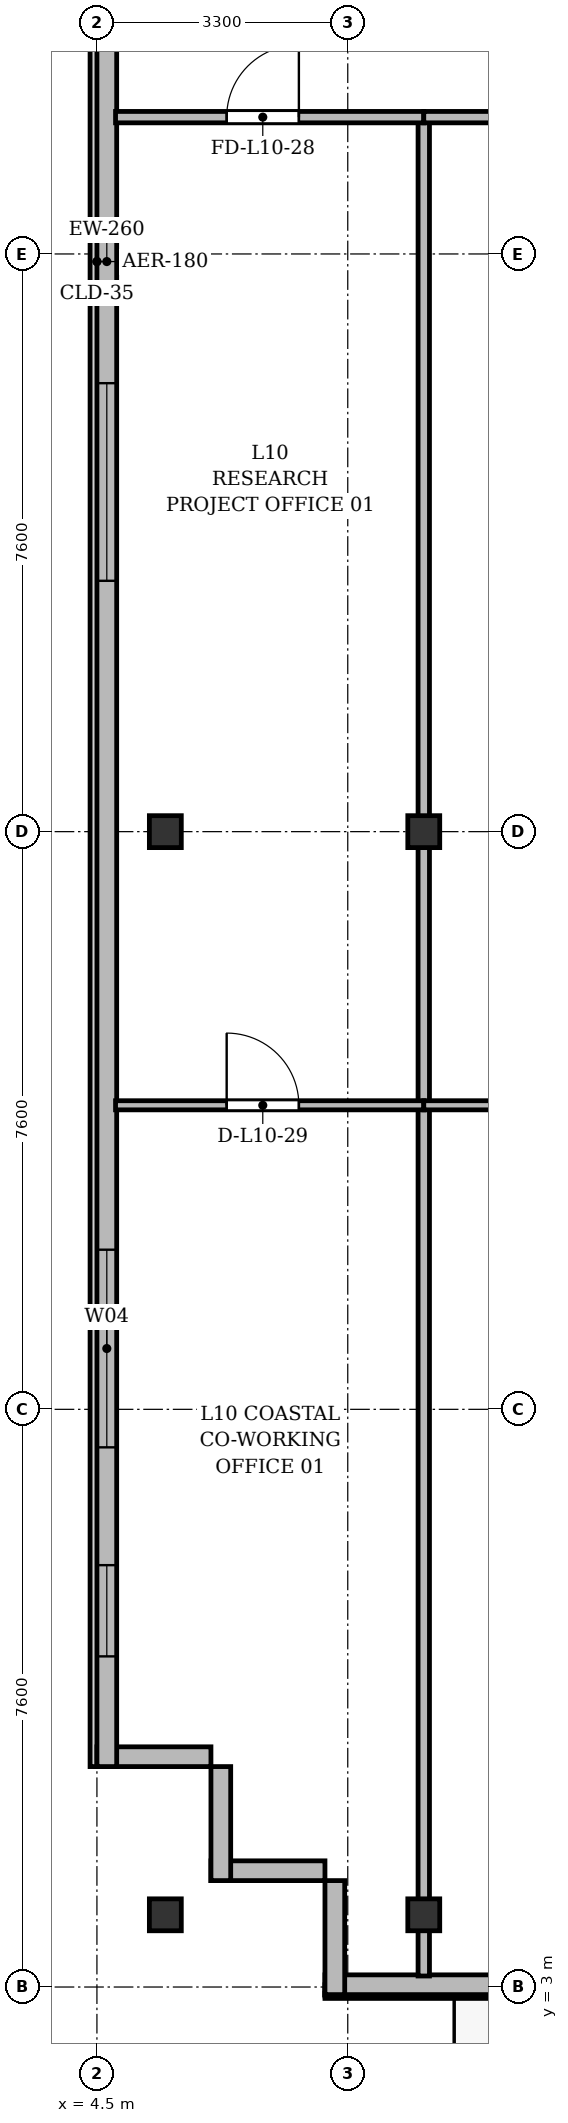
"""IFC4 building model, lengths in metres.
Left out: names, types, materials, properties, quantities, classifications, styles, units other than length and angle.
Written with IfcOpenShell. Run it as: python <this file> out.ifc"""

import sys

from ifc_helpers import new_model, si_unit, direction, frame, frame_2d, origin, origin_2d, place, context, subcontext, project, spatial, rectangle, i_section, extrude, source, transform, mapped, element, fill, save


model = new_model("IFC4")
c1 = context("Model", 3, precision=1e-05, world=origin(), true_north=direction((0.0, 1.0)))
c2 = subcontext(c1, "Body", "Model", "MODEL_VIEW")
j1 = project(units=[si_unit("LENGTHUNIT", "METRE"), si_unit("PLANEANGLEUNIT", "RADIAN")], contexts=[c1])
p1 = place(None, origin())
s1 = spatial("IfcSite", under=j1, at=p1, CompositionType="ELEMENT")
p2 = place(p1, origin())
s2 = spatial("IfcBuilding", under=s1, at=p2, CompositionType="ELEMENT")
p3 = place(p2, frame((0.0, 0.0, 41.5)))
s3 = spatial("IfcBuildingStorey", under=s2, at=p3, CompositionType="ELEMENT", Elevation=41.5)
m1 = source(origin(), c2, "Body", "SweptSolid", [
    extrude(i_section(OverallWidth=0.42, OverallDepth=0.42, WebThickness=0.026, FlangeThickness=0.04, at=origin_2d()), origin(), (0.0, 0.0, 1.0), 3.6),
])
for number, where, z_axis, x_axis in (
    (1, (5.4, 3.95, 0.0), (0.0, 0.0, 1.0), (1.0, 0.0, 0.0)),
    (2, (5.4, 18.2, 0.0), (0.0, 0.0, 1.0), (1.0, 0.0, 0.0)),
    (3, (8.8, 3.95, 0.0), (0.0, 0.0, 1.0), (1.0, 0.0, 0.0)),
    (4, (8.8, 18.2, 0.0), (0.0, 0.0, 1.0), (1.0, 0.0, 0.0)),
):
    element("IfcColumn", number, at=place(p3, frame(where, z_axis=z_axis, x_axis=x_axis)), inside=s3, PredefinedType="COLUMN", context=c2, shape_type="MappedRepresentation", body=[
        mapped(m1, transform((0.0, 0.0, 0.0), x_axis=(1.0, 0.0, 0.0), y_axis=(0.0, 1.0, 0.0), z_axis=(0.0, 0.0, 1.0), scale=1.0)),
    ])
for number, where, z_axis, x_axis in (
    (5, (7.5, 4.53, 0.0), (0.0, 0.0, 1.0), (-1.0, 0.0, 0.0)),
    (6, (6.13, 4.4, 0.0), (0.0, 0.0, 1.0), (0.0, 1.0, 0.0)),
):
    element("IfcWall", number, at=place(p3, frame(where, z_axis=z_axis, x_axis=x_axis)), inside=s3, PredefinedType="SOLIDWALL", context=c2, shape_type="SweptSolid", body=[
        extrude(rectangle(XDim=1.5, YDim=0.26, at=frame_2d((0.75, 0.0))), origin(), (0.0, 0.0, 1.0), 3.34),
    ])
p4 = place(p3, frame((6.0, 6.03, 0.0), z_axis=(0.0, 0.0, 1.0), x_axis=(-1.0, 0.0, 0.0)))
e7 = element("IfcWall", 7, at=p4, inside=s3, PredefinedType="SOLIDWALL", context=c2, shape_type="SweptSolid", body=[
    extrude(rectangle(XDim=1.5, YDim=0.26, at=frame_2d((0.75, 0.0))), origin(), (0.0, 0.0, 1.0), 2.752),
])
p5 = place(p3, frame((4.63, 5.9, 0.0), z_axis=(0.0, 0.0, 1.0), x_axis=(0.0, 1.0, 0.0)))
e8 = element("IfcWall", 8, at=p5, inside=s3, PredefinedType="SOLIDWALL", context=c2, shape_type="SweptSolid", body=[
    extrude(rectangle(XDim=39.6, YDim=0.26, at=frame_2d((19.8, 0.0))), origin(), (0.0, 0.0, 1.0), 3.34),
])
p6 = place(p5, frame((1.45, 0.0, 0.92)))
e9 = element("IfcOpeningElement", 9, at=p6, cuts=e8, PredefinedType="OPENING", context=c2, shape_type="SweptSolid", body=[
    extrude(rectangle(XDim=1.2, YDim=1.65, at=frame_2d((0.6, 0.825))), frame((0.0, 0.14, 0.0), z_axis=(0.0, -1.0, 0.0), x_axis=(1.0, 0.0, 0.0)), (0.0, 0.0, 1.0), 0.28),
])
p7 = place(p5, frame((4.2, 0.0, 0.92)))
e10 = element("IfcOpeningElement", 10, at=p7, cuts=e8, PredefinedType="OPENING", context=c2, shape_type="SweptSolid", body=[
    extrude(rectangle(XDim=2.6, YDim=1.9, at=frame_2d((1.3, 0.95))), frame((0.0, 0.14, 0.0), z_axis=(0.0, -1.0, 0.0), x_axis=(1.0, 0.0, 0.0)), (0.0, 0.0, 1.0), 0.28),
])
p8 = place(p5, frame((15.6, 0.0, 0.92)))
e11 = element("IfcOpeningElement", 11, at=p8, cuts=e8, PredefinedType="OPENING", context=c2, shape_type="SweptSolid", body=[
    extrude(rectangle(XDim=2.6, YDim=1.9, at=frame_2d((1.3, 0.95))), frame((0.0, 0.14, 0.0), z_axis=(0.0, -1.0, 0.0), x_axis=(1.0, 0.0, 0.0)), (0.0, 0.0, 1.0), 0.28),
])
p9 = place(p5, frame((29.6, 0.0, 0.92)))
e12 = element("IfcOpeningElement", 12, at=p9, cuts=e8, PredefinedType="OPENING", context=c2, shape_type="SweptSolid", body=[
    extrude(rectangle(XDim=2.6, YDim=1.9, at=frame_2d((1.3, 0.95))), frame((0.0, 0.14, 0.0), z_axis=(0.0, -1.0, 0.0), x_axis=(1.0, 0.0, 0.0)), (0.0, 0.0, 1.0), 0.28),
])
p10 = place(p5, frame((33.9, 0.0, 0.92)))
e13 = element("IfcOpeningElement", 13, at=p10, cuts=e8, PredefinedType="OPENING", context=c2, shape_type="SweptSolid", body=[
    extrude(rectangle(XDim=1.2, YDim=1.65, at=frame_2d((0.6, 0.825))), frame((0.0, 0.14, 0.0), z_axis=(0.0, -1.0, 0.0), x_axis=(1.0, 0.0, 0.0)), (0.0, 0.0, 1.0), 0.28),
])
p11 = place(p5, frame((37.25, 0.0, 0.92)))
e14 = element("IfcOpeningElement", 14, at=p11, cuts=e8, PredefinedType="OPENING", context=c2, shape_type="SweptSolid", body=[
    extrude(rectangle(XDim=1.2, YDim=1.65, at=frame_2d((0.6, 0.825))), frame((0.0, 0.14, 0.0), z_axis=(0.0, -1.0, 0.0), x_axis=(1.0, 0.0, 0.0)), (0.0, 0.0, 1.0), 0.28),
])
p12 = place(p3, frame((66.9, 3.03, 0.0), z_axis=(0.0, 0.0, 1.0), x_axis=(-1.0, 0.0, 0.0)))
e15 = element("IfcWall", 15, at=p12, inside=s3, PredefinedType="SOLIDWALL", context=c2, shape_type="SweptSolid", body=[
    extrude(rectangle(XDim=59.4, YDim=0.26, at=frame_2d((29.7, 0.0))), origin(), (0.0, 0.0, 1.0), 3.34),
])
p13 = place(p12, frame((3.6, 0.0, 0.9)))
e16 = element("IfcOpeningElement", 16, at=p13, cuts=e15, PredefinedType="OPENING", context=c2, shape_type="SweptSolid", body=[
    extrude(rectangle(XDim=2.2, YDim=1.8, at=frame_2d((1.1, 0.9))), frame((0.0, 0.14, 0.0), z_axis=(0.0, -1.0, 0.0), x_axis=(1.0, 0.0, 0.0)), (0.0, 0.0, 1.0), 0.28),
])
p14 = place(p12, frame((9.565, 0.0, 0.0)))
e17 = element("IfcOpeningElement", 17, at=p14, cuts=e15, PredefinedType="OPENING", context=c2, shape_type="SweptSolid", body=[
    extrude(rectangle(XDim=1.2, YDim=2.2, at=frame_2d((0.6, 1.1))), frame((0.0, 0.14, 0.0), z_axis=(0.0, -1.0, 0.0), x_axis=(1.0, 0.0, 0.0)), (0.0, 0.0, 1.0), 0.28),
])
p15 = place(p12, frame((18.5, 0.0, 0.9)))
e18 = element("IfcOpeningElement", 18, at=p15, cuts=e15, PredefinedType="OPENING", context=c2, shape_type="SweptSolid", body=[
    extrude(rectangle(XDim=2.0, YDim=1.95, at=frame_2d((1.0, 0.975))), frame((0.0, 0.14, 0.0), z_axis=(0.0, -1.0, 0.0), x_axis=(1.0, 0.0, 0.0)), (0.0, 0.0, 1.0), 0.28),
])
p16 = place(p12, frame((28.875, 0.0, 0.9)))
e19 = element("IfcOpeningElement", 19, at=p16, cuts=e15, PredefinedType="OPENING", context=c2, shape_type="SweptSolid", body=[
    extrude(rectangle(XDim=1.65, YDim=1.85, at=frame_2d((0.825, 0.925))), frame((0.0, 0.14, 0.0), z_axis=(0.0, -1.0, 0.0), x_axis=(1.0, 0.0, 0.0)), (0.0, 0.0, 1.0), 0.28),
])
p17 = place(p12, frame((40.301, 0.0, 0.0)))
e20 = element("IfcOpeningElement", 20, at=p17, cuts=e15, PredefinedType="OPENING", context=c2, shape_type="SweptSolid", body=[
    extrude(rectangle(XDim=1.2, YDim=2.2, at=frame_2d((0.6, 1.1))), frame((0.0, 0.14, 0.0), z_axis=(0.0, -1.0, 0.0), x_axis=(1.0, 0.0, 0.0)), (0.0, 0.0, 1.0), 0.28),
])
p18 = place(p12, frame((46.3, 0.0, 0.9)))
e21 = element("IfcOpeningElement", 21, at=p18, cuts=e15, PredefinedType="OPENING", context=c2, shape_type="SweptSolid", body=[
    extrude(rectangle(XDim=2.2, YDim=1.8, at=frame_2d((1.1, 0.9))), frame((0.0, 0.14, 0.0), z_axis=(0.0, -1.0, 0.0), x_axis=(1.0, 0.0, 0.0)), (0.0, 0.0, 1.0), 0.28),
])
p19 = place(p12, frame((55.817, 0.0, 0.0)))
e22 = element("IfcOpeningElement", 22, at=p19, cuts=e15, PredefinedType="OPENING", context=c2, shape_type="SweptSolid", body=[
    extrude(rectangle(XDim=1.2, YDim=2.2, at=frame_2d((0.6, 1.1))), frame((0.0, 0.14, 0.0), z_axis=(0.0, -1.0, 0.0), x_axis=(1.0, 0.0, 0.0)), (0.0, 0.0, 1.0), 0.28),
])
p20 = place(p3, frame((7.63, 2.9, 0.0), z_axis=(0.0, 0.0, 1.0), x_axis=(0.0, 1.0, 0.0)))
e23 = element("IfcWall", 23, at=p20, inside=s3, PredefinedType="SOLIDWALL", context=c2, shape_type="SweptSolid", body=[
    extrude(rectangle(XDim=1.5, YDim=0.26, at=frame_2d((0.75, 0.0))), origin(), (0.0, 0.0, 1.0), 2.69),
])
p21 = place(p3, frame((8.8, 3.145, 0.0), z_axis=(0.0, 0.0, 1.0), x_axis=(0.0, 1.0, 0.0)))
e24 = element("IfcWall", 24, at=p21, inside=s3, PredefinedType="PARTITIONING", context=c2, shape_type="SweptSolid", body=[
    extrude(rectangle(XDim=24.455, YDim=0.15, at=frame_2d((12.228, 0.0))), origin(), (0.0, 0.0, 1.0), 2.752),
])
p22 = place(p3, frame((4.745, 27.6, 0.0), z_axis=(0.0, 0.0, 1.0), x_axis=(1.0, 0.0, 0.0)))
e25 = element("IfcWall", 25, at=p22, inside=s3, PredefinedType="PARTITIONING", context=c2, shape_type="SweptSolid", body=[
    extrude(rectangle(XDim=4.055, YDim=0.15, at=frame_2d((2.027, 0.0))), origin(), (0.0, 0.0, 1.0), 2.752),
])
p23 = place(p22, frame((1.462, 0.0, 0.0)))
e26 = element("IfcOpeningElement", 26, at=p23, cuts=e25, PredefinedType="OPENING", context=c2, shape_type="SweptSolid", body=[
    extrude(rectangle(XDim=0.95, YDim=2.15, at=frame_2d((0.475, 1.075))), frame((0.0, 0.085, 0.0), z_axis=(0.0, -1.0, 0.0), x_axis=(1.0, 0.0, 0.0)), (0.0, 0.0, 1.0), 0.17),
])
p24 = place(p3, frame((4.745, 14.6, 0.0), z_axis=(0.0, 0.0, 1.0), x_axis=(1.0, 0.0, 0.0)))
e27 = element("IfcWall", 27, at=p24, inside=s3, PredefinedType="PARTITIONING", context=c2, shape_type="SweptSolid", body=[
    extrude(rectangle(XDim=4.055, YDim=0.12, at=frame_2d((2.027, 0.0))), origin(), (0.0, 0.0, 1.0), 2.752),
])
p25 = place(p24, frame((1.462, 0.0, 0.0)))
e28 = element("IfcOpeningElement", 28, at=p25, cuts=e27, PredefinedType="OPENING", context=c2, shape_type="SweptSolid", body=[
    extrude(rectangle(XDim=0.95, YDim=2.15, at=frame_2d((0.475, 1.075))), frame((0.0, 0.07, 0.0), z_axis=(0.0, -1.0, 0.0), x_axis=(1.0, 0.0, 0.0)), (0.0, 0.0, 1.0), 0.14),
])
p26 = place(p3, frame((8.8, 27.6, 0.0), z_axis=(0.0, 0.0, 1.0), x_axis=(1.0, 0.0, 0.0)))
e29 = element("IfcWall", 29, at=p26, inside=s3, PredefinedType="PARTITIONING", context=c2, shape_type="SweptSolid", body=[
    extrude(rectangle(XDim=6.8, YDim=0.15, at=frame_2d((3.4, 0.0))), origin(), (0.0, 0.0, 1.0), 2.752),
])
p27 = place(p26, frame((2.925, 0.0, 0.0)))
e30 = element("IfcOpeningElement", 30, at=p27, cuts=e29, PredefinedType="OPENING", context=c2, shape_type="SweptSolid", body=[
    extrude(rectangle(XDim=0.95, YDim=2.15, at=frame_2d((0.475, 1.075))), frame((0.0, 0.085, 0.0), z_axis=(0.0, -1.0, 0.0), x_axis=(1.0, 0.0, 0.0)), (0.0, 0.0, 1.0), 0.17),
])
p28 = place(p3, frame((8.8, 14.6, 0.0), z_axis=(0.0, 0.0, 1.0), x_axis=(1.0, 0.0, 0.0)))
e31 = element("IfcWall", 31, at=p28, inside=s3, PredefinedType="PARTITIONING", context=c2, shape_type="SweptSolid", body=[
    extrude(rectangle(XDim=6.8, YDim=0.12, at=frame_2d((3.4, 0.0))), origin(), (0.0, 0.0, 1.0), 2.752),
])
p29 = place(p28, frame((2.925, 0.0, 0.0)))
e32 = element("IfcOpeningElement", 32, at=p29, cuts=e31, PredefinedType="OPENING", context=c2, shape_type="SweptSolid", body=[
    extrude(rectangle(XDim=0.95, YDim=2.15, at=frame_2d((0.475, 1.075))), frame((0.0, 0.07, 0.0), z_axis=(0.0, -1.0, 0.0), x_axis=(1.0, 0.0, 0.0)), (0.0, 0.0, 1.0), 0.14),
])
m2 = source(origin(), c2, "Body", "SweptSolid", [
    extrude(rectangle(XDim=1.2, YDim=1.65, at=frame_2d((0.6, 0.825))), frame((0.0, 0.03, 0.0), z_axis=(0.0, -1.0, 0.0), x_axis=(1.0, 0.0, 0.0)), (0.0, 0.0, 1.0), 0.06),
])
p30 = place(p6, origin())
e33 = element("IfcWindow", 33, at=p30, inside=s3, PartitioningType="SINGLE_PANEL", PredefinedType="WINDOW", context=c2, shape_type="MappedRepresentation", body=[
    mapped(m2, transform((0.0, 0.0, 0.0), x_axis=(1.0, 0.0, 0.0), y_axis=(0.0, 1.0, 0.0), z_axis=(0.0, 0.0, 1.0), scale=1.0)),
])
fill(e9, e33)
m3 = source(origin(), c2, "Body", "SweptSolid", [
    extrude(rectangle(XDim=2.6, YDim=1.9, at=frame_2d((1.3, 0.95))), frame((0.0, 0.03, 0.0), z_axis=(0.0, -1.0, 0.0), x_axis=(1.0, 0.0, 0.0)), (0.0, 0.0, 1.0), 0.06),
])
p31 = place(p7, origin())
e34 = element("IfcWindow", 34, at=p31, inside=s3, PartitioningType="SINGLE_PANEL", PredefinedType="WINDOW", context=c2, shape_type="MappedRepresentation", body=[
    mapped(m3, transform((0.0, 0.0, 0.0), x_axis=(1.0, 0.0, 0.0), y_axis=(0.0, 1.0, 0.0), z_axis=(0.0, 0.0, 1.0), scale=1.0)),
])
fill(e10, e34)
p32 = place(p8, origin())
e35 = element("IfcWindow", 35, at=p32, inside=s3, PartitioningType="SINGLE_PANEL", PredefinedType="WINDOW", context=c2, shape_type="MappedRepresentation", body=[
    mapped(m3, transform((0.0, 0.0, 0.0), x_axis=(1.0, 0.0, 0.0), y_axis=(0.0, 1.0, 0.0), z_axis=(0.0, 0.0, 1.0), scale=1.0)),
])
fill(e11, e35)
m4 = source(origin(), c2, "Body", "SweptSolid", [
    extrude(rectangle(XDim=0.95, YDim=2.15, at=frame_2d((0.475, 1.075))), frame((0.0, 0.025, 0.0), z_axis=(0.0, -1.0, 0.0), x_axis=(1.0, 0.0, 0.0)), (0.0, 0.0, 1.0), 0.05),
])
p33 = place(p23, origin())
e36 = element("IfcDoor", 36, at=p33, inside=s3, OperationType="SINGLE_SWING_RIGHT", PredefinedType="DOOR", context=c2, shape_type="MappedRepresentation", body=[
    mapped(m4, transform((0.0, 0.0, 0.0), x_axis=(1.0, 0.0, 0.0), y_axis=(0.0, 1.0, 0.0), z_axis=(0.0, 0.0, 1.0), scale=1.0)),
])
fill(e26, e36)
p34 = place(p25, origin())
e37 = element("IfcDoor", 37, at=p34, inside=s3, OperationType="SINGLE_SWING_LEFT", PredefinedType="DOOR", context=c2, shape_type="MappedRepresentation", body=[
    mapped(m4, transform((0.0, 0.0, 0.0), x_axis=(1.0, 0.0, 0.0), y_axis=(0.0, 1.0, 0.0), z_axis=(0.0, 0.0, 1.0), scale=1.0)),
])
fill(e28, e37)
save(model, sys.argv[1])
